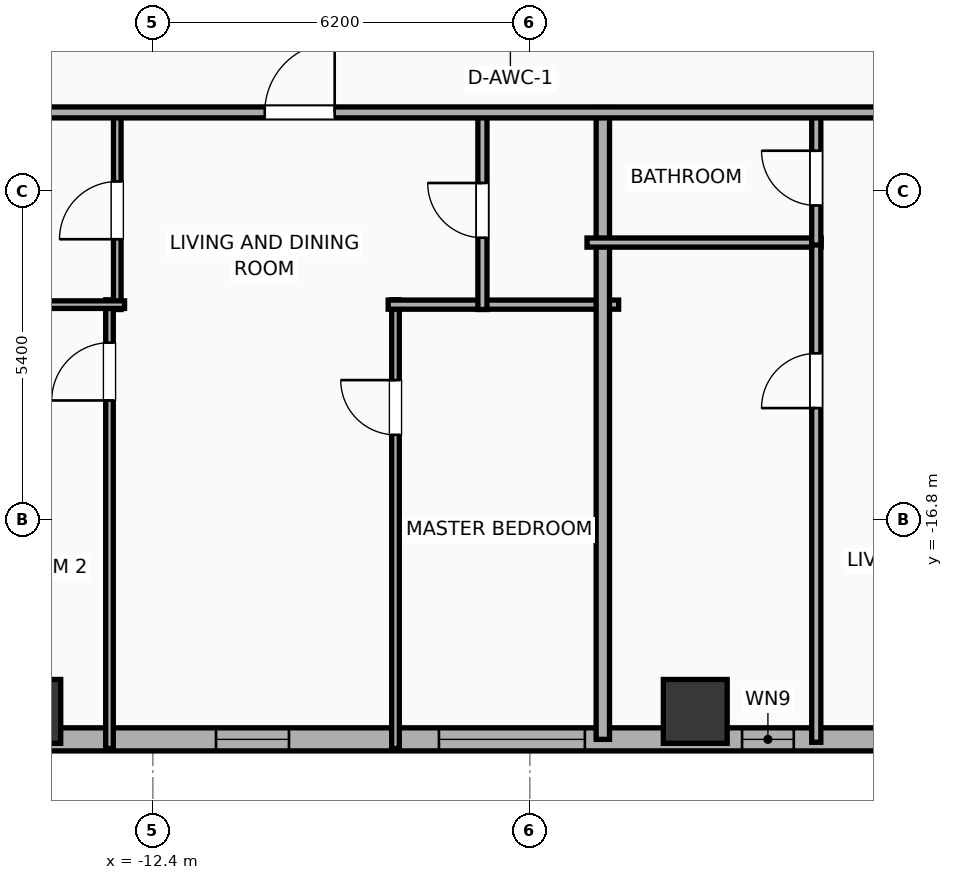
"""IFC4 building model, lengths in metres.
Left out: names, types, materials, properties, quantities, classifications, styles, units other than length and angle.
Written with IfcOpenShell. Run it as: python <this file> out.ifc"""

import sys

from ifc_helpers import new_model, si_unit, direction, frame, frame_2d, origin, origin_2d, place, context, subcontext, project, spatial, rectangle, hollow_rectangle, extrude, element, fill, save


model = new_model("IFC4")
c1 = context("Model", 3, precision=1e-05, world=origin(), true_north=direction((0.0, 1.0)))
c2 = subcontext(c1, "Body", "Model", "MODEL_VIEW")
j1 = project(units=[si_unit("LENGTHUNIT", "METRE"), si_unit("PLANEANGLEUNIT", "RADIAN")], contexts=[c1])
p1 = place(None, origin())
s1 = spatial("IfcSite", under=j1, at=p1, CompositionType="ELEMENT")
p2 = place(p1, origin())
s2 = spatial("IfcBuilding", under=s1, at=p2, CompositionType="ELEMENT")
p3 = place(p2, frame((0.0, 0.0, 97.5)))
s3 = spatial("IfcBuildingStorey", under=s2, at=p3, CompositionType="ELEMENT", Elevation=97.5)
for number, where, z_axis, x_axis in (
    (1, (-14.44, -19.95, 0.0), (0.0, 0.0, 1.0), (1.0, 0.0, 0.0)),
    (2, (-3.48, -19.95, 0.0), (0.0, 0.0, 1.0), (1.0, 0.0, 0.0)),
):
    element("IfcColumn", number, at=place(p3, frame(where, z_axis=z_axis, x_axis=x_axis)), inside=s3, PredefinedType="COLUMN", context=c2, shape_type="SweptSolid", body=[
        extrude(hollow_rectangle(XDim=1.05, YDim=1.05, WallThickness=0.036, at=origin_2d()), origin(), (0.0, 0.0, 1.0), 3.9),
    ])
p4 = place(p3, frame((29.381, -20.41, 0.0), z_axis=(0.0, 0.0, 1.0), x_axis=(-1.0, 0.0, 0.0)))
e3 = element("IfcWall", 3, at=p4, inside=s3, PredefinedType="ELEMENTEDWALL", context=c2, shape_type="SweptSolid", body=[
    extrude(rectangle(XDim=54.763, YDim=0.38, at=frame_2d((27.381, 0.0))), origin(), (0.0, 0.0, 1.0), 3.65),
])
p5 = place(p4, frame((6.495, 0.0, 0.75)))
e4 = element("IfcOpeningElement", 4, at=p5, cuts=e3, PredefinedType="OPENING", context=c2, shape_type="SweptSolid", body=[
    extrude(rectangle(XDim=2.4, YDim=2.1, at=frame_2d((1.2, 1.05))), frame((0.0, 0.2, 0.0), z_axis=(0.0, -1.0, 0.0), x_axis=(1.0, 0.0, 0.0)), (0.0, 0.0, 1.0), 0.4),
])
p6 = place(p4, frame((17.686, 0.0, 0.75)))
e5 = element("IfcOpeningElement", 5, at=p6, cuts=e3, PredefinedType="OPENING", context=c2, shape_type="SweptSolid", body=[
    extrude(rectangle(XDim=2.4, YDim=2.1, at=frame_2d((1.2, 1.05))), frame((0.0, 0.2, 0.0), z_axis=(0.0, -1.0, 0.0), x_axis=(1.0, 0.0, 0.0)), (0.0, 0.0, 1.0), 0.4),
])
p7 = place(p4, frame((34.677, 0.0, 0.75)))
e6 = element("IfcOpeningElement", 6, at=p7, cuts=e3, PredefinedType="OPENING", context=c2, shape_type="SweptSolid", body=[
    extrude(rectangle(XDim=2.4, YDim=2.1, at=frame_2d((1.2, 1.05))), frame((0.0, 0.2, 0.0), z_axis=(0.0, -1.0, 0.0), x_axis=(1.0, 0.0, 0.0)), (0.0, 0.0, 1.0), 0.4),
])
p8 = place(p4, frame((45.867, 0.0, 0.75)))
e7 = element("IfcOpeningElement", 7, at=p8, cuts=e3, PredefinedType="OPENING", context=c2, shape_type="SweptSolid", body=[
    extrude(rectangle(XDim=2.4, YDim=2.1, at=frame_2d((1.2, 1.05))), frame((0.0, 0.2, 0.0), z_axis=(0.0, -1.0, 0.0), x_axis=(1.0, 0.0, 0.0)), (0.0, 0.0, 1.0), 0.4),
])
p9 = place(p4, frame((52.281, 0.0, 0.75)))
e8 = element("IfcOpeningElement", 8, at=p9, cuts=e3, PredefinedType="OPENING", context=c2, shape_type="SweptSolid", body=[
    extrude(rectangle(XDim=1.2, YDim=2.05, at=frame_2d((0.6, 1.025))), frame((0.0, 0.2, 0.0), z_axis=(0.0, -1.0, 0.0), x_axis=(1.0, 0.0, 0.0)), (0.0, 0.0, 1.0), 0.4),
])
p10 = place(p4, frame((49.641, 0.0, 0.75)))
e9 = element("IfcOpeningElement", 9, at=p10, cuts=e3, PredefinedType="OPENING", context=c2, shape_type="SweptSolid", body=[
    extrude(rectangle(XDim=1.2, YDim=2.05, at=frame_2d((0.6, 1.025))), frame((0.0, 0.2, 0.0), z_axis=(0.0, -1.0, 0.0), x_axis=(1.0, 0.0, 0.0)), (0.0, 0.0, 1.0), 0.4),
])
p11 = place(p4, frame((39.543, 0.0, 0.75)))
e10 = element("IfcOpeningElement", 10, at=p11, cuts=e3, PredefinedType="OPENING", context=c2, shape_type="SweptSolid", body=[
    extrude(rectangle(XDim=1.2, YDim=2.05, at=frame_2d((0.6, 1.025))), frame((0.0, 0.2, 0.0), z_axis=(0.0, -1.0, 0.0), x_axis=(1.0, 0.0, 0.0)), (0.0, 0.0, 1.0), 0.4),
])
p12 = place(p4, frame((44.538, 0.0, 0.75)))
e11 = element("IfcOpeningElement", 11, at=p12, cuts=e3, PredefinedType="OPENING", context=c2, shape_type="SweptSolid", body=[
    extrude(rectangle(XDim=0.52, YDim=2.05, at=frame_2d((0.26, 1.025))), frame((0.0, 0.2, 0.0), z_axis=(0.0, -1.0, 0.0), x_axis=(1.0, 0.0, 0.0)), (0.0, 0.0, 1.0), 0.4),
])
p13 = place(p4, frame((28.206, 0.0, 0.75)))
e12 = element("IfcOpeningElement", 12, at=p13, cuts=e3, PredefinedType="OPENING", context=c2, shape_type="SweptSolid", body=[
    extrude(rectangle(XDim=1.2, YDim=2.05, at=frame_2d((0.6, 1.025))), frame((0.0, 0.2, 0.0), z_axis=(0.0, -1.0, 0.0), x_axis=(1.0, 0.0, 0.0)), (0.0, 0.0, 1.0), 0.4),
])
p14 = place(p4, frame((31.241, 0.0, 0.75)))
e13 = element("IfcOpeningElement", 13, at=p14, cuts=e3, PredefinedType="OPENING", context=c2, shape_type="SweptSolid", body=[
    extrude(rectangle(XDim=0.85, YDim=2.05, at=frame_2d((0.425, 1.025))), frame((0.0, 0.2, 0.0), z_axis=(0.0, -1.0, 0.0), x_axis=(1.0, 0.0, 0.0)), (0.0, 0.0, 1.0), 0.4),
])
p15 = place(p4, frame((24.561, 0.0, 0.75)))
e14 = element("IfcOpeningElement", 14, at=p15, cuts=e3, PredefinedType="OPENING", context=c2, shape_type="SweptSolid", body=[
    extrude(rectangle(XDim=1.2, YDim=2.05, at=frame_2d((0.6, 1.025))), frame((0.0, 0.2, 0.0), z_axis=(0.0, -1.0, 0.0), x_axis=(1.0, 0.0, 0.0)), (0.0, 0.0, 1.0), 0.4),
])
p16 = place(p4, frame((22.561, 0.0, 0.75)))
e15 = element("IfcOpeningElement", 15, at=p16, cuts=e3, PredefinedType="OPENING", context=c2, shape_type="SweptSolid", body=[
    extrude(rectangle(XDim=0.52, YDim=2.05, at=frame_2d((0.26, 1.025))), frame((0.0, 0.2, 0.0), z_axis=(0.0, -1.0, 0.0), x_axis=(1.0, 0.0, 0.0)), (0.0, 0.0, 1.0), 0.4),
])
p17 = place(p4, frame((13.886, 0.0, 0.75)))
e16 = element("IfcOpeningElement", 16, at=p17, cuts=e3, PredefinedType="OPENING", context=c2, shape_type="SweptSolid", body=[
    extrude(rectangle(XDim=1.2, YDim=2.05, at=frame_2d((0.6, 1.025))), frame((0.0, 0.2, 0.0), z_axis=(0.0, -1.0, 0.0), x_axis=(1.0, 0.0, 0.0)), (0.0, 0.0, 1.0), 0.4),
])
p18 = place(p4, frame((11.694, 0.0, 0.75)))
e17 = element("IfcOpeningElement", 17, at=p18, cuts=e3, PredefinedType="OPENING", context=c2, shape_type="SweptSolid", body=[
    extrude(rectangle(XDim=0.85, YDim=2.05, at=frame_2d((0.425, 1.025))), frame((0.0, 0.2, 0.0), z_axis=(0.0, -1.0, 0.0), x_axis=(1.0, 0.0, 0.0)), (0.0, 0.0, 1.0), 0.4),
])
p19 = place(p4, frame((3.286, 0.0, 0.75)))
e18 = element("IfcOpeningElement", 18, at=p19, cuts=e3, PredefinedType="OPENING", context=c2, shape_type="SweptSolid", body=[
    extrude(rectangle(XDim=1.2, YDim=2.05, at=frame_2d((0.6, 1.025))), frame((0.0, 0.2, 0.0), z_axis=(0.0, -1.0, 0.0), x_axis=(1.0, 0.0, 0.0)), (0.0, 0.0, 1.0), 0.4),
])
p20 = place(p4, frame((0.816, 0.0, 0.75)))
e19 = element("IfcOpeningElement", 19, at=p20, cuts=e3, PredefinedType="OPENING", context=c2, shape_type="SweptSolid", body=[
    extrude(rectangle(XDim=1.2, YDim=2.05, at=frame_2d((0.6, 1.025))), frame((0.0, 0.2, 0.0), z_axis=(0.0, -1.0, 0.0), x_axis=(1.0, 0.0, 0.0)), (0.0, 0.0, 1.0), 0.4),
])
p21 = place(p3, frame((-13.113, -20.56, 0.0), z_axis=(0.0, 0.0, 1.0), x_axis=(0.0, 1.0, 0.0)))
e20 = element("IfcWall", 20, at=p21, inside=s3, PredefinedType="PARTITIONING", context=c2, shape_type="SweptSolid", body=[
    extrude(rectangle(XDim=7.379, YDim=0.125, at=frame_2d((3.689, 0.0))), origin(), (0.0, 0.0, 1.0), 3.65),
])
p22 = place(p21, frame((5.723, 0.0, 0.0)))
e21 = element("IfcOpeningElement", 21, at=p22, cuts=e20, PredefinedType="OPENING", context=c2, shape_type="SweptSolid", body=[
    extrude(rectangle(XDim=0.95, YDim=2.05, at=frame_2d((0.475, 1.025))), frame((0.0, 0.073, 0.0), z_axis=(0.0, -1.0, 0.0), x_axis=(1.0, 0.0, 0.0)), (0.0, 0.0, 1.0), 0.145),
])
p23 = place(p3, frame((-8.41, -20.56, 0.0), z_axis=(0.0, 0.0, 1.0), x_axis=(0.0, 1.0, 0.0)))
e22 = element("IfcWall", 22, at=p23, inside=s3, PredefinedType="PARTITIONING", context=c2, shape_type="SweptSolid", body=[
    extrude(rectangle(XDim=7.379, YDim=0.125, at=frame_2d((3.689, 0.0))), origin(), (0.0, 0.0, 1.0), 3.65),
])
p24 = place(p23, frame((5.158, 0.0, 0.0)))
e23 = element("IfcOpeningElement", 23, at=p24, cuts=e22, PredefinedType="OPENING", context=c2, shape_type="SweptSolid", body=[
    extrude(rectangle(XDim=0.9, YDim=2.05, at=frame_2d((0.45, 1.025))), frame((0.0, 0.073, 0.0), z_axis=(0.0, -1.0, 0.0), x_axis=(1.0, 0.0, 0.0)), (0.0, 0.0, 1.0), 0.145),
])
p25 = place(p3, frame((-8.53, -13.261, 0.0), z_axis=(0.0, 0.0, 1.0), x_axis=(1.0, 0.0, 0.0)))
e24 = element("IfcWall", 24, at=p25, inside=s3, PredefinedType="PLUMBINGWALL", context=c2, shape_type="SweptSolid", body=[
    extrude(rectangle(XDim=3.79, YDim=0.15, at=frame_2d((1.895, 0.0))), origin(), (0.0, 0.0, 1.0), 3.65),
])
p26 = place(p3, frame((-12.985, -13.341, 0.0), z_axis=(0.0, 0.0, 1.0), x_axis=(0.0, 1.0, 0.0)))
e25 = element("IfcWall", 25, at=p26, inside=s3, PredefinedType="PARTITIONING", context=c2, shape_type="SweptSolid", body=[
    extrude(rectangle(XDim=3.261, YDim=0.125, at=frame_2d((1.63, 0.0))), origin(), (0.0, 0.0, 1.0), 3.65),
])
p27 = place(p26, frame((1.156, 0.0, 0.0)))
e26 = element("IfcOpeningElement", 26, at=p27, cuts=e25, PredefinedType="OPENING", context=c2, shape_type="SweptSolid", body=[
    extrude(rectangle(XDim=0.95, YDim=2.05, at=frame_2d((0.475, 1.025))), frame((0.0, 0.073, 0.0), z_axis=(0.0, -1.0, 0.0), x_axis=(1.0, 0.0, 0.0)), (0.0, 0.0, 1.0), 0.145),
])
p28 = place(p3, frame((-16.06, -13.261, 0.0), z_axis=(0.0, 0.0, 1.0), x_axis=(1.0, 0.0, 0.0)))
e27 = element("IfcWall", 27, at=p28, inside=s3, PredefinedType="PARTITIONING", context=c2, shape_type="SweptSolid", body=[
    extrude(rectangle(XDim=3.195, YDim=0.125, at=frame_2d((1.598, 0.0))), origin(), (0.0, 0.0, 1.0), 3.65),
])
p29 = place(p3, frame((-6.98, -13.341, 0.0), z_axis=(0.0, 0.0, 1.0), x_axis=(0.0, 1.0, 0.0)))
e28 = element("IfcWall", 28, at=p29, inside=s3, PredefinedType="PLUMBINGWALL", context=c2, shape_type="SweptSolid", body=[
    extrude(rectangle(XDim=3.261, YDim=0.15, at=frame_2d((1.63, 0.0))), origin(), (0.0, 0.0, 1.0), 3.65),
])
p30 = place(p29, frame((1.18, 0.0, 0.0)))
e29 = element("IfcOpeningElement", 29, at=p30, cuts=e28, PredefinedType="OPENING", context=c2, shape_type="SweptSolid", body=[
    extrude(rectangle(XDim=0.9, YDim=2.05, at=frame_2d((0.45, 1.025))), frame((0.0, 0.085, 0.0), z_axis=(0.0, -1.0, 0.0), x_axis=(1.0, 0.0, 0.0)), (0.0, 0.0, 1.0), 0.17),
])
p31 = place(p3, frame((-5.0, -20.41, 0.0), z_axis=(0.0, 0.0, 1.0), x_axis=(0.0, 1.0, 0.0)))
e30 = element("IfcWall", 30, at=p31, inside=s3, PredefinedType="PARTITIONING", context=c2, shape_type="SweptSolid", body=[
    extrude(rectangle(XDim=10.39, YDim=0.22, at=frame_2d((5.195, 0.0))), origin(), (0.0, 0.0, 1.0), 3.65),
])
p32 = place(p3, frame((-5.26, -12.24, 0.0), z_axis=(0.0, 0.0, 1.0), x_axis=(1.0, 0.0, 0.0)))
e31 = element("IfcWall", 31, at=p32, inside=s3, PredefinedType="PLUMBINGWALL", context=c2, shape_type="SweptSolid", body=[
    extrude(rectangle(XDim=3.85, YDim=0.15, at=frame_2d((1.925, 0.0))), origin(), (0.0, 0.0, 1.0), 3.65),
])
p33 = place(p3, frame((-1.49, -20.458, 0.0), z_axis=(0.0, 0.0, 1.0), x_axis=(0.0, 1.0, 0.0)))
e32 = element("IfcWall", 32, at=p33, inside=s3, PredefinedType="PLUMBINGWALL", context=c2, shape_type="SweptSolid", body=[
    extrude(rectangle(XDim=8.258, YDim=0.15, at=frame_2d((4.129, 0.0))), origin(), (0.0, 0.0, 1.0), 3.65),
])
p34 = place(p33, frame((5.496, 0.0, 0.0)))
e33 = element("IfcOpeningElement", 33, at=p34, cuts=e32, PredefinedType="OPENING", context=c2, shape_type="SweptSolid", body=[
    extrude(rectangle(XDim=0.9, YDim=2.05, at=frame_2d((0.45, 1.025))), frame((0.0, 0.085, 0.0), z_axis=(0.0, -1.0, 0.0), x_axis=(1.0, 0.0, 0.0)), (0.0, 0.0, 1.0), 0.17),
])
p35 = place(p3, frame((-1.49, -12.28, 0.0), z_axis=(0.0, 0.0, 1.0), x_axis=(0.0, 1.0, 0.0)))
e34 = element("IfcWall", 34, at=p35, inside=s3, PredefinedType="PLUMBINGWALL", context=c2, shape_type="SweptSolid", body=[
    extrude(rectangle(XDim=2.2, YDim=0.15, at=frame_2d((1.1, 0.0))), origin(), (0.0, 0.0, 1.0), 3.65),
])
p36 = place(p35, frame((0.65, 0.0, 0.0)))
e35 = element("IfcOpeningElement", 35, at=p36, cuts=e34, PredefinedType="OPENING", context=c2, shape_type="SweptSolid", body=[
    extrude(rectangle(XDim=0.9, YDim=2.05, at=frame_2d((0.45, 1.025))), frame((0.0, 0.085, 0.0), z_axis=(0.0, -1.0, 0.0), x_axis=(1.0, 0.0, 0.0)), (0.0, 0.0, 1.0), 0.17),
])
p37 = place(p3, frame((-29.21, -10.1, 0.0), z_axis=(0.0, 0.0, 1.0), x_axis=(1.0, 0.0, 0.0)))
e36 = element("IfcWall", 36, at=p37, inside=s3, PredefinedType="PARTITIONING", context=c2, shape_type="SweptSolid", body=[
    extrude(rectangle(XDim=62.42, YDim=0.18, at=frame_2d((31.21, 0.0))), origin(), (0.0, 0.0, 1.0), 3.65),
])
p38 = place(p37, frame((3.033, 0.0, 0.0)))
e37 = element("IfcOpeningElement", 37, at=p38, cuts=e36, PredefinedType="OPENING", context=c2, shape_type="SweptSolid", body=[
    extrude(rectangle(XDim=0.9, YDim=2.05, at=frame_2d((0.45, 1.025))), frame((0.0, 0.1, 0.0), z_axis=(0.0, -1.0, 0.0), x_axis=(1.0, 0.0, 0.0)), (0.0, 0.0, 1.0), 0.2),
])
p39 = place(p37, frame((9.768, 0.0, 0.0)))
e38 = element("IfcOpeningElement", 38, at=p39, cuts=e36, PredefinedType="OPENING", context=c2, shape_type="SweptSolid", body=[
    extrude(rectangle(XDim=0.9, YDim=2.05, at=frame_2d((0.45, 1.025))), frame((0.0, 0.1, 0.0), z_axis=(0.0, -1.0, 0.0), x_axis=(1.0, 0.0, 0.0)), (0.0, 0.0, 1.0), 0.2),
])
p40 = place(p37, frame((18.65, 0.0, 0.0)))
e39 = element("IfcOpeningElement", 39, at=p40, cuts=e36, PredefinedType="OPENING", context=c2, shape_type="SweptSolid", body=[
    extrude(rectangle(XDim=1.15, YDim=2.05, at=frame_2d((0.575, 1.025))), frame((0.0, 0.1, 0.0), z_axis=(0.0, -1.0, 0.0), x_axis=(1.0, 0.0, 0.0)), (0.0, 0.0, 1.0), 0.2),
])
p41 = place(p37, frame((29.212, 0.0, 0.0)))
e40 = element("IfcOpeningElement", 40, at=p41, cuts=e36, PredefinedType="OPENING", context=c2, shape_type="SweptSolid", body=[
    extrude(rectangle(XDim=1.15, YDim=2.05, at=frame_2d((0.575, 1.025))), frame((0.0, 0.1, 0.0), z_axis=(0.0, -1.0, 0.0), x_axis=(1.0, 0.0, 0.0)), (0.0, 0.0, 1.0), 0.2),
])
p42 = place(p37, frame((40.379, 0.0, 0.0)))
e41 = element("IfcOpeningElement", 41, at=p42, cuts=e36, PredefinedType="OPENING", context=c2, shape_type="SweptSolid", body=[
    extrude(rectangle(XDim=1.15, YDim=2.05, at=frame_2d((0.575, 1.025))), frame((0.0, 0.1, 0.0), z_axis=(0.0, -1.0, 0.0), x_axis=(1.0, 0.0, 0.0)), (0.0, 0.0, 1.0), 0.2),
])
p43 = place(p37, frame((50.959, 0.0, 0.0)))
e42 = element("IfcOpeningElement", 42, at=p43, cuts=e36, PredefinedType="OPENING", context=c2, shape_type="SweptSolid", body=[
    extrude(rectangle(XDim=1.15, YDim=2.05, at=frame_2d((0.575, 1.025))), frame((0.0, 0.1, 0.0), z_axis=(0.0, -1.0, 0.0), x_axis=(1.0, 0.0, 0.0)), (0.0, 0.0, 1.0), 0.2),
])
p44 = place(p37, frame((59.117, 0.0, 0.0)))
e43 = element("IfcOpeningElement", 43, at=p44, cuts=e36, PredefinedType="OPENING", context=c2, shape_type="SweptSolid", body=[
    extrude(rectangle(XDim=0.9, YDim=2.05, at=frame_2d((0.45, 1.025))), frame((0.0, 0.1, 0.0), z_axis=(0.0, -1.0, 0.0), x_axis=(1.0, 0.0, 0.0)), (0.0, 0.0, 1.0), 0.2),
])
p45 = place(p7, origin())
e44 = element("IfcWindow", 44, at=p45, inside=s3, PartitioningType="SINGLE_PANEL", PredefinedType="WINDOW", context=c2, shape_type="SweptSolid", body=[
    extrude(rectangle(XDim=2.4, YDim=2.1, at=frame_2d((1.2, 1.05))), frame((0.0, 0.03, 0.0), z_axis=(0.0, -1.0, 0.0), x_axis=(1.0, 0.0, 0.0)), (0.0, 0.0, 1.0), 0.06),
])
fill(e6, e44)
p46 = place(p11, origin())
e45 = element("IfcWindow", 45, at=p46, inside=s3, PartitioningType="SINGLE_PANEL", PredefinedType="WINDOW", context=c2, shape_type="SweptSolid", body=[
    extrude(rectangle(XDim=1.2, YDim=2.05, at=frame_2d((0.6, 1.025))), frame((0.0, 0.03, 0.0), z_axis=(0.0, -1.0, 0.0), x_axis=(1.0, 0.0, 0.0)), (0.0, 0.0, 1.0), 0.06),
])
fill(e10, e45)
p47 = place(p14, origin())
e46 = element("IfcWindow", 46, at=p47, inside=s3, PartitioningType="SINGLE_PANEL", PredefinedType="WINDOW", context=c2, shape_type="SweptSolid", body=[
    extrude(rectangle(XDim=0.85, YDim=2.05, at=frame_2d((0.425, 1.025))), frame((0.0, 0.03, 0.0), z_axis=(0.0, -1.0, 0.0), x_axis=(1.0, 0.0, 0.0)), (0.0, 0.0, 1.0), 0.06),
])
fill(e13, e46)
p48 = place(p22, origin())
e47 = element("IfcDoor", 47, at=p48, inside=s3, OperationType="SINGLE_SWING_LEFT", PredefinedType="DOOR", context=c2, shape_type="SweptSolid", body=[
    extrude(rectangle(XDim=0.95, YDim=2.05, at=frame_2d((0.475, 1.025))), frame((0.0, 0.025, 0.0), z_axis=(0.0, -1.0, 0.0), x_axis=(1.0, 0.0, 0.0)), (0.0, 0.0, 1.0), 0.05),
])
fill(e21, e47)
p49 = place(p24, origin())
e48 = element("IfcDoor", 48, at=p49, inside=s3, OperationType="SINGLE_SWING_RIGHT", PredefinedType="DOOR", context=c2, shape_type="SweptSolid", body=[
    extrude(rectangle(XDim=0.9, YDim=2.05, at=frame_2d((0.45, 1.025))), frame((0.0, 0.025, 0.0), z_axis=(0.0, -1.0, 0.0), x_axis=(1.0, 0.0, 0.0)), (0.0, 0.0, 1.0), 0.05),
])
fill(e23, e48)
p50 = place(p27, origin())
e49 = element("IfcDoor", 49, at=p50, inside=s3, OperationType="SINGLE_SWING_LEFT", PredefinedType="DOOR", context=c2, shape_type="SweptSolid", body=[
    extrude(rectangle(XDim=0.95, YDim=2.05, at=frame_2d((0.475, 1.025))), frame((0.0, 0.025, 0.0), z_axis=(0.0, -1.0, 0.0), x_axis=(1.0, 0.0, 0.0)), (0.0, 0.0, 1.0), 0.05),
])
fill(e26, e49)
p51 = place(p30, origin())
e50 = element("IfcDoor", 50, at=p51, inside=s3, OperationType="SINGLE_SWING_RIGHT", PredefinedType="DOOR", context=c2, shape_type="SweptSolid", body=[
    extrude(rectangle(XDim=0.9, YDim=2.05, at=frame_2d((0.45, 1.025))), frame((0.0, 0.025, 0.0), z_axis=(0.0, -1.0, 0.0), x_axis=(1.0, 0.0, 0.0)), (0.0, 0.0, 1.0), 0.05),
])
fill(e29, e50)
p52 = place(p34, origin())
e51 = element("IfcDoor", 51, at=p52, inside=s3, OperationType="SINGLE_SWING_LEFT", PredefinedType="DOOR", context=c2, shape_type="SweptSolid", body=[
    extrude(rectangle(XDim=0.9, YDim=2.05, at=frame_2d((0.45, 1.025))), frame((0.0, 0.025, 0.0), z_axis=(0.0, -1.0, 0.0), x_axis=(1.0, 0.0, 0.0)), (0.0, 0.0, 1.0), 0.05),
])
fill(e33, e51)
p53 = place(p36, origin())
e52 = element("IfcDoor", 52, at=p53, inside=s3, OperationType="SINGLE_SWING_RIGHT", PredefinedType="DOOR", context=c2, shape_type="SweptSolid", body=[
    extrude(rectangle(XDim=0.9, YDim=2.05, at=frame_2d((0.45, 1.025))), frame((0.0, 0.025, 0.0), z_axis=(0.0, -1.0, 0.0), x_axis=(1.0, 0.0, 0.0)), (0.0, 0.0, 1.0), 0.05),
])
fill(e35, e52)
p54 = place(p40, origin())
e53 = element("IfcDoor", 53, at=p54, inside=s3, OperationType="SINGLE_SWING_RIGHT", PredefinedType="DOOR", context=c2, shape_type="SweptSolid", body=[
    extrude(rectangle(XDim=1.15, YDim=2.05, at=frame_2d((0.575, 1.025))), frame((0.0, 0.025, 0.0), z_axis=(0.0, -1.0, 0.0), x_axis=(1.0, 0.0, 0.0)), (0.0, 0.0, 1.0), 0.05),
])
fill(e39, e53)
save(model, sys.argv[1])
